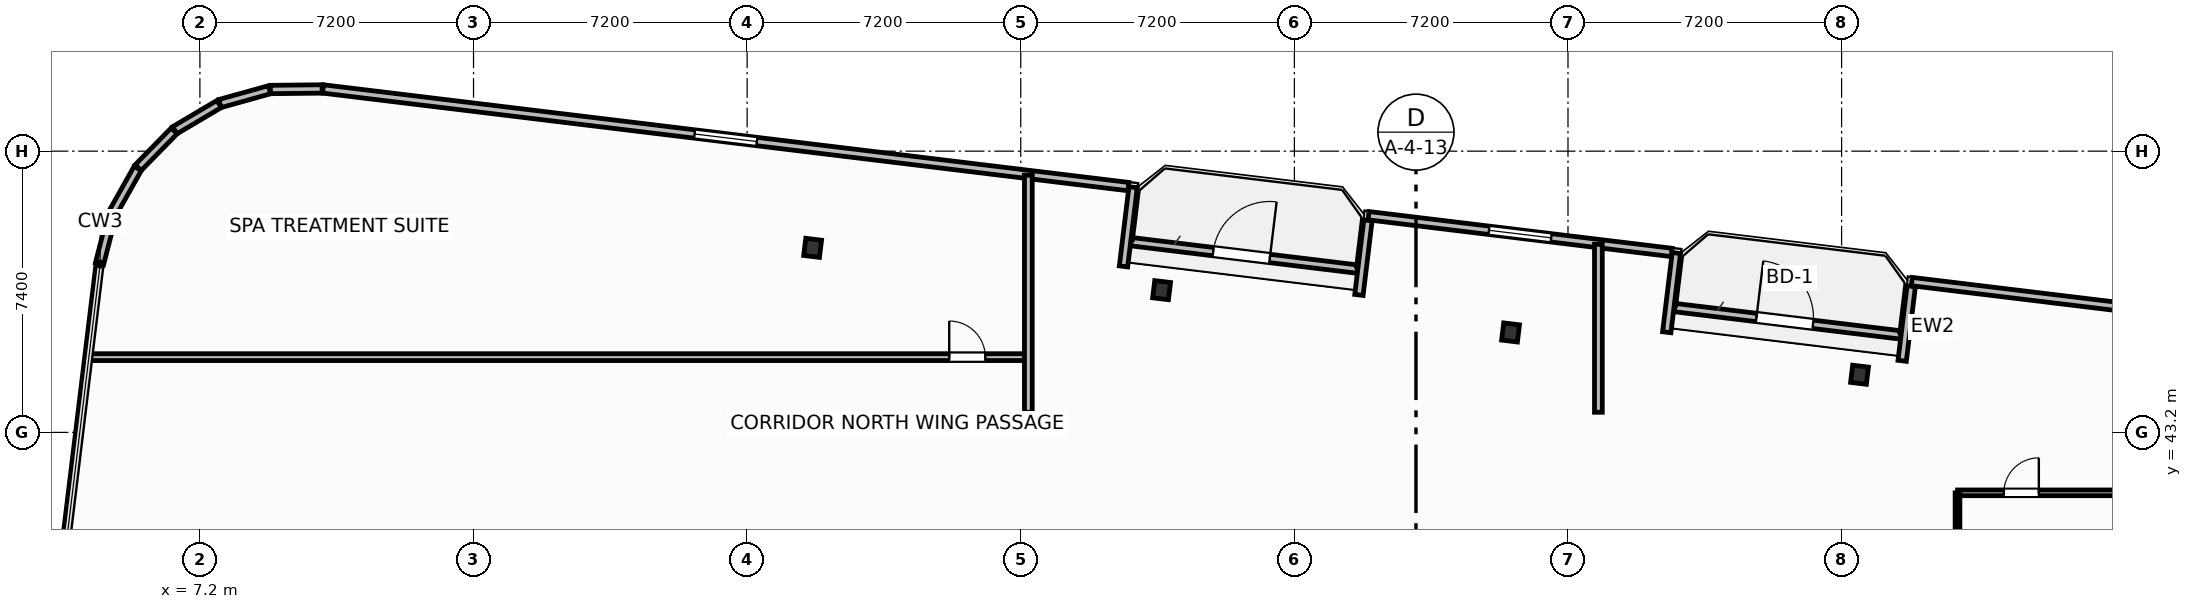
"""IFC4 building model, lengths in metres.
Left out: names, types, materials, properties, quantities, classifications, styles, units other than length and angle.
Written with IfcOpenShell. Run it as: python <this file> out.ifc"""

import sys

from ifc_helpers import new_model, si_unit, direction, frame, frame_2d, origin, origin_2d, place, context, subcontext, project, spatial, rectangle, i_section, extrude, element, fill, save


model = new_model("IFC4")
c1 = context("Model", 3, precision=1e-05, world=origin(), true_north=direction((0.0, 1.0)))
c2 = subcontext(c1, "Body", "Model", "MODEL_VIEW")
j1 = project(units=[si_unit("LENGTHUNIT", "METRE"), si_unit("PLANEANGLEUNIT", "RADIAN")], contexts=[c1])
p1 = place(None, origin())
s1 = spatial("IfcSite", under=j1, at=p1, CompositionType="ELEMENT")
p2 = place(p1, origin())
s2 = spatial("IfcBuilding", under=s1, at=p2, CompositionType="ELEMENT")
p3 = place(p2, frame((0.0, 0.0, 158.7)))
s3 = spatial("IfcBuildingStorey", under=s2, at=p3, CompositionType="ELEMENT", Elevation=158.7)
for number, where, z_axis, x_axis in (
    (1, (50.872, 44.717, 0.0), (0.0, 0.0, 1.0), (0.993, -0.12, 0.0)),
    (2, (41.689, 45.83, 0.0), (0.0, 0.0, 1.0), (0.993, -0.12, 0.0)),
    (3, (32.506, 46.943, 0.0), (0.0, 0.0, 1.0), (0.993, -0.12, 0.0)),
    (4, (23.323, 48.056, 0.0), (0.0, 0.0, 1.0), (0.993, -0.12, 0.0)),
):
    element("IfcColumn", number, at=place(p3, frame(where, z_axis=z_axis, x_axis=x_axis)), inside=s3, PredefinedType="COLUMN", context=c2, shape_type="SweptSolid", body=[
        extrude(i_section(OverallWidth=0.418, OverallDepth=0.455, WebThickness=0.042, FlangeThickness=0.068, FilletRadius=0.025, at=origin_2d()), origin(), (0.0, 0.0, 1.0), 3.7),
    ])
p4 = place(p3, frame((31.704, 48.219, 0.0), z_axis=(0.0, 0.0, 1.0), x_axis=(0.992730541282, -0.12035810071, 0.0)))
e5 = element("IfcWall", 5, at=p4, inside=s3, PredefinedType="SOLIDWALL", context=c2, shape_type="SweptSolid", body=[
    extrude(rectangle(XDim=6.0, YDim=0.22, at=frame_2d((3.0, 0.0))), origin(), (0.0, 0.0, 1.0), 2.66),
])
p5 = place(p4, frame((2.176, 0.0, 0.0)))
e6 = element("IfcOpeningElement", 6, at=p5, cuts=e5, PredefinedType="OPENING", context=c2, shape_type="SweptSolid", body=[
    extrude(rectangle(XDim=1.5, YDim=2.25, at=frame_2d((0.75, 1.125))), frame((0.0, 0.12, 0.0), z_axis=(0.0, -1.0, 0.0), x_axis=(1.0, 0.0, 0.0)), (0.0, 0.0, 1.0), 0.24),
])
p6 = place(p3, frame((45.999, 46.486, 0.0), z_axis=(0.0, 0.0, 1.0), x_axis=(0.992734813078, -0.120322861101, 0.0)))
e7 = element("IfcWall", 7, at=p6, inside=s3, PredefinedType="SOLIDWALL", context=c2, shape_type="SweptSolid", body=[
    extrude(rectangle(XDim=6.0, YDim=0.22, at=frame_2d((3.0, 0.0))), origin(), (0.0, 0.0, 1.0), 2.66),
])
p7 = place(p6, frame((2.176, 0.0, 0.0)))
e8 = element("IfcOpeningElement", 8, at=p7, cuts=e7, PredefinedType="OPENING", context=c2, shape_type="SweptSolid", body=[
    extrude(rectangle(XDim=1.5, YDim=2.25, at=frame_2d((0.75, 1.125))), frame((0.0, 0.12, 0.0), z_axis=(0.0, -1.0, 0.0), x_axis=(1.0, 0.0, 0.0)), (0.0, 0.0, 1.0), 0.24),
])
p8 = place(p3, frame((73.538, 44.588, 0.0), z_axis=(0.0, 0.0, 1.0), x_axis=(-0.992733493583, 0.120333747213, 0.0)))
e9 = element("IfcWall", 9, at=p8, inside=s3, PredefinedType="SOLIDWALL", context=c2, shape_type="SweptSolid", body=[
    extrude(rectangle(XDim=21.447, YDim=0.22, at=frame_2d((10.724, 0.0))), origin(), (0.0, 0.0, 1.0), 2.66),
])
p9 = place(p8, frame((9.899, 0.0, 0.8)))
e10 = element("IfcOpeningElement", 10, at=p9, cuts=e9, PredefinedType="OPENING", context=c2, shape_type="SweptSolid", body=[
    extrude(rectangle(XDim=1.65, YDim=1.65, at=frame_2d((0.825, 0.825))), frame((0.0, 0.12, 0.0), z_axis=(0.0, -1.0, 0.0), x_axis=(1.0, 0.0, 0.0)), (0.0, 0.0, 1.0), 0.24),
])
p10 = place(p3, frame((52.231, 47.045, 0.0), z_axis=(0.0, 0.0, 1.0), x_axis=(-0.120275992932, -0.992740492538, 0.0)))
e11 = element("IfcWall", 11, at=p10, inside=s3, PredefinedType="SOLIDWALL", context=c2, shape_type="SweptSolid", body=[
    extrude(rectangle(XDim=1.975, YDim=0.22, at=frame_2d((0.988, 0.0))), origin(), (0.0, 0.0, 1.0), 2.66),
])
p11 = place(p3, frame((45.799, 45.835, 0.0), z_axis=(0.0, 0.0, 1.0), x_axis=(0.120314009587, 0.992735885871, 0.0)))
e12 = element("IfcWall", 12, at=p11, inside=s3, PredefinedType="SOLIDWALL", context=c2, shape_type="SweptSolid", body=[
    extrude(rectangle(XDim=2.1, YDim=0.22, at=frame_2d((1.05, 0.0))), origin(), (0.0, 0.0, 1.0), 2.66),
])
p12 = place(p3, frame((45.928, 47.935, 0.0), z_axis=(0.0, 0.0, 1.0), x_axis=(-0.992730591876, 0.120357683402, 0.0)))
e13 = element("IfcWall", 13, at=p12, inside=s3, PredefinedType="SOLIDWALL", context=c2, shape_type="SweptSolid", body=[
    extrude(rectangle(XDim=8.035, YDim=0.22, at=frame_2d((4.017, 0.0))), origin(), (0.0, 0.0, 1.0), 2.66),
])
p13 = place(p12, frame((3.192, 0.0, 0.8)))
e14 = element("IfcOpeningElement", 14, at=p13, cuts=e13, PredefinedType="OPENING", context=c2, shape_type="SweptSolid", body=[
    extrude(rectangle(XDim=1.65, YDim=1.65, at=frame_2d((0.825, 0.825))), frame((0.0, 0.12, 0.0), z_axis=(0.0, -1.0, 0.0), x_axis=(1.0, 0.0, 0.0)), (0.0, 0.0, 1.0), 0.24),
])
p14 = place(p3, frame((37.936, 48.778, 0.0), z_axis=(0.0, 0.0, 1.0), x_axis=(-0.120397815541, -0.992725725472, 0.0)))
e15 = element("IfcWall", 15, at=p14, inside=s3, PredefinedType="SOLIDWALL", context=c2, shape_type="SweptSolid", body=[
    extrude(rectangle(XDim=1.975, YDim=0.22, at=frame_2d((0.988, 0.0))), origin(), (0.0, 0.0, 1.0), 2.66),
])
p15 = place(p3, frame((31.504, 47.568, 0.0), z_axis=(0.0, 0.0, 1.0), x_axis=(0.120341784665, 0.992732519294, 0.0)))
e16 = element("IfcWall", 16, at=p15, inside=s3, PredefinedType="SOLIDWALL", context=c2, shape_type="SweptSolid", body=[
    extrude(rectangle(XDim=2.1, YDim=0.22, at=frame_2d((1.05, 0.0))), origin(), (0.0, 0.0, 1.0), 2.66),
])
p16 = place(p3, frame((31.633, 49.668, 0.0), z_axis=(0.0, 0.0, 1.0), x_axis=(-0.992731670483, 0.120348786531, 0.0)))
e17 = element("IfcWall", 17, at=p16, inside=s3, PredefinedType="SOLIDWALL", context=c2, shape_type="SweptSolid", body=[
    extrude(rectangle(XDim=21.347, YDim=0.22, at=frame_2d((10.674, 0.0))), origin(), (0.0, 0.0, 1.0), 2.66),
])
p17 = place(p16, frame((9.849, 0.0, 0.8)))
e18 = element("IfcOpeningElement", 18, at=p17, cuts=e17, PredefinedType="OPENING", context=c2, shape_type="SweptSolid", body=[
    extrude(rectangle(XDim=1.65, YDim=1.65, at=frame_2d((0.825, 0.825))), frame((0.0, 0.12, 0.0), z_axis=(0.0, -1.0, 0.0), x_axis=(1.0, 0.0, 0.0)), (0.0, 0.0, 1.0), 0.24),
])
p18 = place(p3, frame((10.416, 52.237, 0.0), z_axis=(0.0, 0.0, 1.0), x_axis=(-0.999947718056, -0.010225514878, 0.0)))
e19 = element("IfcWall", 19, at=p18, inside=s3, PredefinedType="SOLIDWALL", context=c2, shape_type="SweptSolid", body=[
    extrude(rectangle(XDim=1.361, YDim=0.22, at=frame_2d((0.68, 0.0))), origin(), (0.0, 0.0, 1.0), 2.66),
])
for number, where, z_axis, x_axis in (
    (20, (9.031, 52.216, 0.0), (0.0, 0.0, 1.0), (-0.963, -0.269, 0.0)),
    (21, (7.706, 51.84, 0.0), (0.0, 0.0, 1.0), (-0.861, -0.509, 0.0)),
):
    element("IfcWall", number, at=place(p3, frame(where, z_axis=z_axis, x_axis=x_axis)), inside=s3, PredefinedType="SOLIDWALL", context=c2, shape_type="SweptSolid", body=[
        extrude(rectangle(XDim=1.353, YDim=0.22, at=frame_2d((0.677, 0.0))), origin(), (0.0, 0.0, 1.0), 2.66),
    ])
p19 = place(p3, frame((6.523, 51.133, 0.0), z_axis=(0.0, 0.0, 1.0), x_axis=(-0.699762925925, -0.714375144795, 0.0)))
e22 = element("IfcWall", 22, at=p19, inside=s3, PredefinedType="SOLIDWALL", context=c2, shape_type="SweptSolid", body=[
    extrude(rectangle(XDim=1.353, YDim=0.22, at=frame_2d((0.677, 0.0))), origin(), (0.0, 0.0, 1.0), 2.66),
])
p20 = place(p3, frame((5.564, 50.145, 0.0), z_axis=(0.0, 0.0, 1.0), x_axis=(-0.491117621399, -0.871093268227, 0.0)))
e23 = element("IfcWall", 23, at=p20, inside=s3, PredefinedType="SOLIDWALL", context=c2, shape_type="SweptSolid", body=[
    extrude(rectangle(XDim=1.353, YDim=0.22, at=frame_2d((0.677, 0.0))), origin(), (0.0, 0.0, 1.0), 2.66),
])
p21 = place(p3, frame((4.894, 48.942, 0.0), z_axis=(0.0, 0.0, 1.0), x_axis=(-0.248857256909, -0.968540172468, 0.0)))
e24 = element("IfcWall", 24, at=p21, inside=s3, PredefinedType="SOLIDWALL", context=c2, shape_type="SweptSolid", body=[
    extrude(rectangle(XDim=1.353, YDim=0.22, at=frame_2d((0.676, 0.0))), origin(), (0.0, 0.0, 1.0), 2.66),
])
p22 = place(p3, frame((53.45, 41.61, 0.0), z_axis=(0.0, 0.0, 1.0), x_axis=(1.0, 0.0, 0.0)))
e25 = element("IfcWall", 25, at=p22, inside=s3, PredefinedType="PARTITIONING", context=c2, shape_type="SweptSolid", body=[
    extrude(rectangle(XDim=16.55, YDim=0.15, at=frame_2d((8.275, 0.0))), origin(), (0.0, 0.0, 1.0), 3.38),
])
p23 = place(p22, frame((1.22, 0.0, 0.0)))
e26 = element("IfcOpeningElement", 26, at=p23, cuts=e25, PredefinedType="OPENING", context=c2, shape_type="SweptSolid", body=[
    extrude(rectangle(XDim=0.92, YDim=2.05, at=frame_2d((0.46, 1.025))), frame((0.0, 0.085, 0.0), z_axis=(0.0, -1.0, 0.0), x_axis=(1.0, 0.0, 0.0)), (0.0, 0.0, 1.0), 0.17),
])
p24 = place(p3, frame((53.45, 39.3, 0.0), z_axis=(0.0, 0.0, 1.0), x_axis=(0.0, 1.0, 0.0)))
e27 = element("IfcWall", 27, at=p24, inside=s3, PredefinedType="PARTITIONING", context=c2, shape_type="SweptSolid", body=[
    extrude(rectangle(XDim=2.31, YDim=0.125, at=frame_2d((1.155, 0.0))), origin(), (0.0, 0.0, 1.0), 3.38),
])
p25 = place(p3, frame((4.319, 45.18, 0.0), z_axis=(0.0, 0.0, 1.0), x_axis=(1.0, 0.0, 0.0)))
e28 = element("IfcWall", 28, at=p25, inside=s3, PredefinedType="PARTITIONING", context=c2, shape_type="SweptSolid", body=[
    extrude(rectangle(XDim=24.601, YDim=0.18, at=frame_2d((12.301, 0.0))), origin(), (0.0, 0.0, 1.0), 3.38),
])
p26 = place(p25, frame((22.599, 0.0, 0.0)))
e29 = element("IfcOpeningElement", 29, at=p26, cuts=e28, PredefinedType="OPENING", context=c2, shape_type="SweptSolid", body=[
    extrude(rectangle(XDim=0.95, YDim=2.05, at=frame_2d((0.475, 1.025))), frame((0.0, 0.1, 0.0), z_axis=(0.0, -1.0, 0.0), x_axis=(1.0, 0.0, 0.0)), (0.0, 0.0, 1.0), 0.2),
])
p27 = place(p3, frame((29.0, 43.73, 0.0), z_axis=(0.0, 0.0, 1.0), x_axis=(0.0, 1.0, 0.0)))
e30 = element("IfcWall", 30, at=p27, inside=s3, PredefinedType="PARTITIONING", context=c2, shape_type="SweptSolid", body=[
    extrude(rectangle(XDim=6.237, YDim=0.205, at=frame_2d((3.118, 0.0))), origin(), (0.0, 0.0, 1.0), 3.38),
])
p28 = place(p3, frame((44.0, 43.73, 0.0), z_axis=(0.0, 0.0, 1.0), x_axis=(0.0, 1.0, 0.0)))
e31 = element("IfcWall", 31, at=p28, inside=s3, PredefinedType="PARTITIONING", context=c2, shape_type="SweptSolid", body=[
    extrude(rectangle(XDim=4.418, YDim=0.205, at=frame_2d((2.209, 0.0))), origin(), (0.0, 0.0, 1.0), 3.38),
])
p29 = place(p5, origin())
e32 = element("IfcDoor", 32, at=p29, inside=s3, OperationType="SINGLE_SWING_RIGHT", PredefinedType="DOOR", context=c2, shape_type="SweptSolid", body=[
    extrude(rectangle(XDim=1.5, YDim=2.25, at=frame_2d((0.75, 1.125))), frame((0.0, 0.025, 0.0), z_axis=(0.0, -1.0, 0.0), x_axis=(1.0, 0.0, 0.0)), (0.0, 0.0, 1.0), 0.05),
])
fill(e6, e32)
p30 = place(p7, origin())
e33 = element("IfcDoor", 33, at=p30, inside=s3, OperationType="SINGLE_SWING_LEFT", PredefinedType="DOOR", context=c2, shape_type="SweptSolid", body=[
    extrude(rectangle(XDim=1.5, YDim=2.25, at=frame_2d((0.75, 1.125))), frame((0.0, 0.025, 0.0), z_axis=(0.0, -1.0, 0.0), x_axis=(1.0, 0.0, 0.0)), (0.0, 0.0, 1.0), 0.05),
])
fill(e8, e33)
p31 = place(p13, origin())
e34 = element("IfcWindow", 34, at=p31, inside=s3, PartitioningType="SINGLE_PANEL", PredefinedType="WINDOW", context=c2, shape_type="SweptSolid", body=[
    extrude(rectangle(XDim=1.65, YDim=1.65, at=frame_2d((0.825, 0.825))), frame((0.0, 0.03, 0.0), z_axis=(0.0, -1.0, 0.0), x_axis=(1.0, 0.0, 0.0)), (0.0, 0.0, 1.0), 0.06),
])
fill(e14, e34)
p32 = place(p17, origin())
e35 = element("IfcWindow", 35, at=p32, inside=s3, PartitioningType="SINGLE_PANEL", PredefinedType="WINDOW", context=c2, shape_type="SweptSolid", body=[
    extrude(rectangle(XDim=1.65, YDim=1.65, at=frame_2d((0.825, 0.825))), frame((0.0, 0.03, 0.0), z_axis=(0.0, -1.0, 0.0), x_axis=(1.0, 0.0, 0.0)), (0.0, 0.0, 1.0), 0.06),
])
fill(e18, e35)
p33 = place(p23, origin())
e36 = element("IfcDoor", 36, at=p33, inside=s3, OperationType="SINGLE_SWING_RIGHT", PredefinedType="DOOR", context=c2, shape_type="SweptSolid", body=[
    extrude(rectangle(XDim=0.92, YDim=2.05, at=frame_2d((0.46, 1.025))), frame((0.0, 0.025, 0.0), z_axis=(0.0, -1.0, 0.0), x_axis=(1.0, 0.0, 0.0)), (0.0, 0.0, 1.0), 0.05),
])
fill(e26, e36)
p34 = place(p26, origin())
e37 = element("IfcDoor", 37, at=p34, inside=s3, OperationType="SINGLE_SWING_LEFT", PredefinedType="DOOR", context=c2, shape_type="SweptSolid", body=[
    extrude(rectangle(XDim=0.95, YDim=2.05, at=frame_2d((0.475, 1.025))), frame((0.0, 0.025, 0.0), z_axis=(0.0, -1.0, 0.0), x_axis=(1.0, 0.0, 0.0)), (0.0, 0.0, 1.0), 0.05),
])
fill(e29, e37)
save(model, sys.argv[1])
